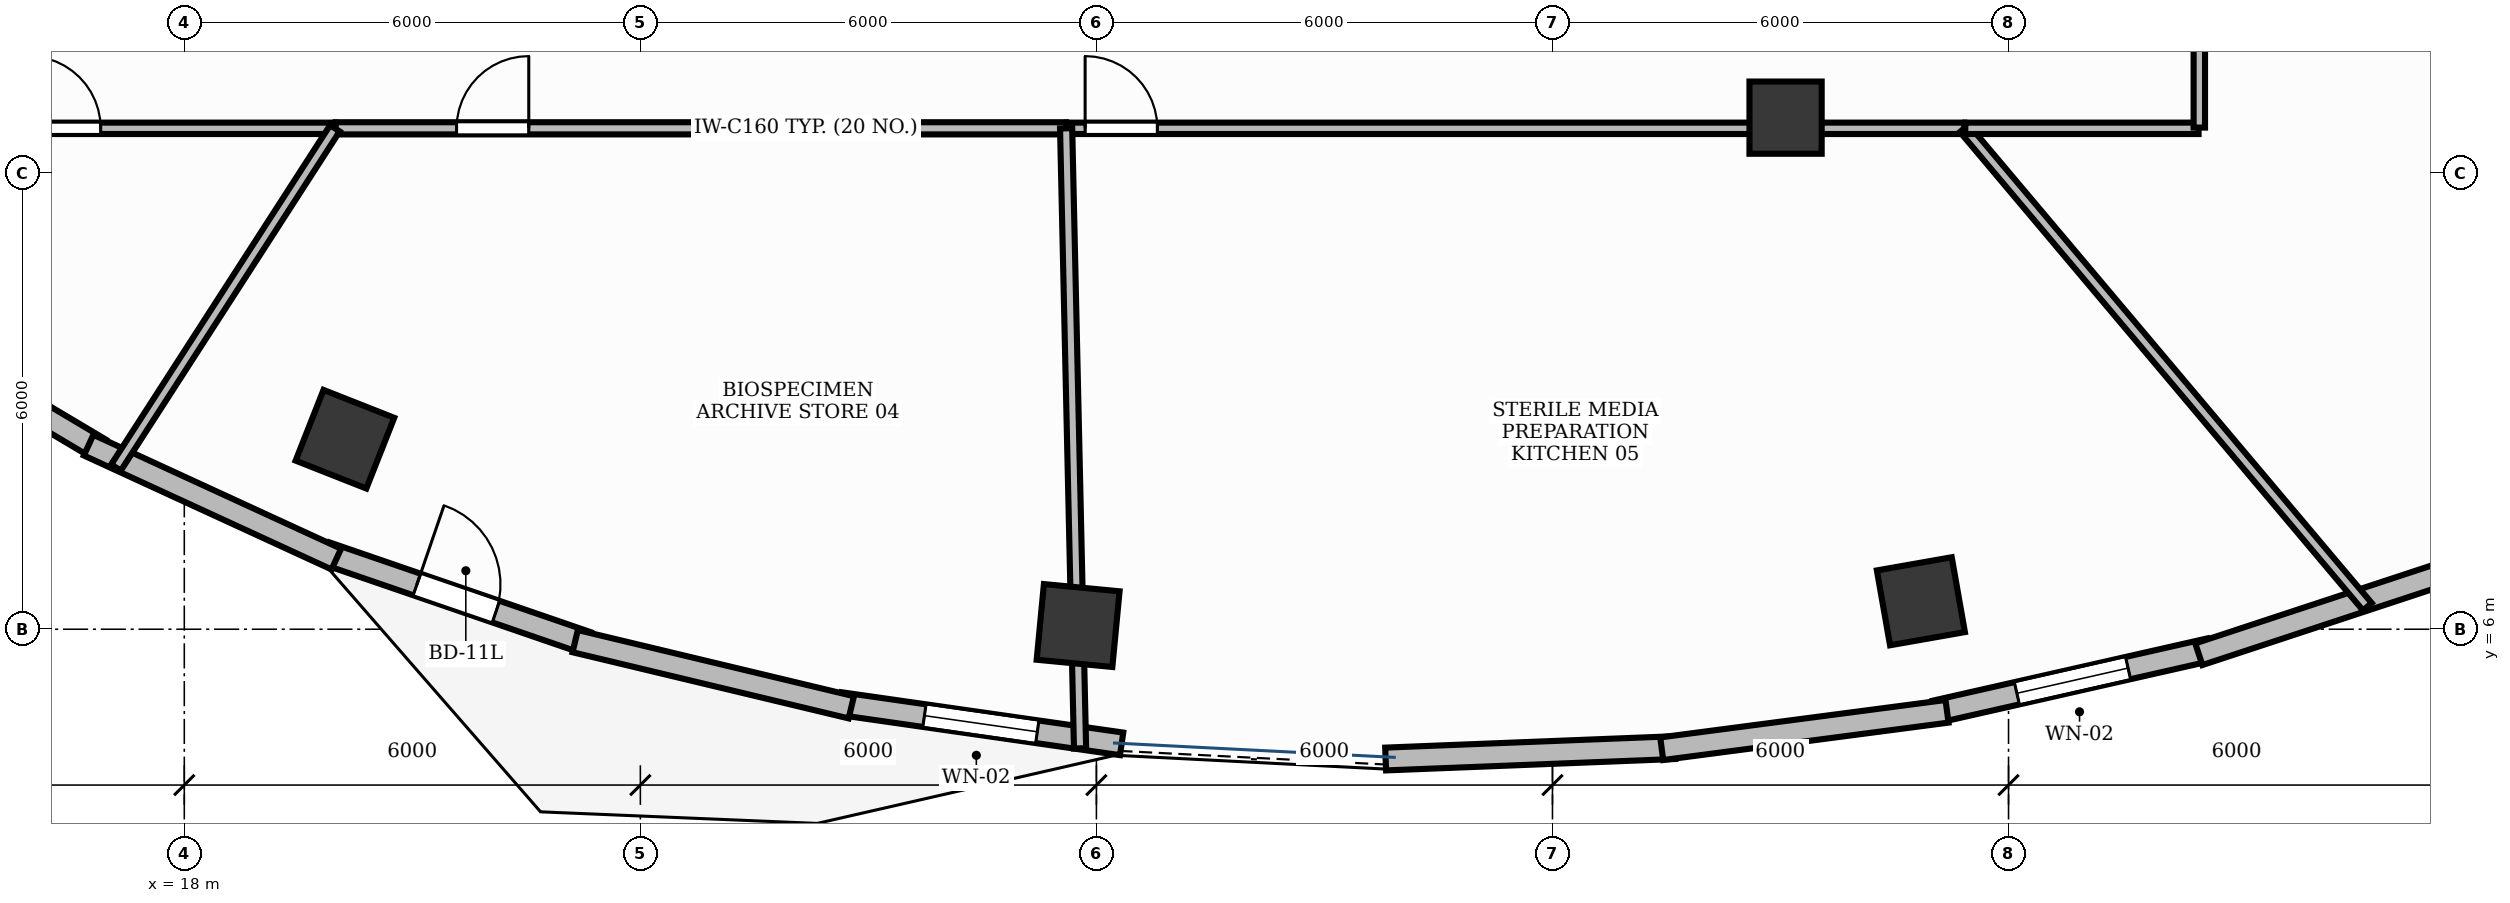
"""IFC4 building model, lengths in metres.
Left out: names, types, materials, properties, quantities, classifications, styles, units other than length and angle.
Written with IfcOpenShell. Run it as: python <this file> out.ifc"""

import sys

from ifc_helpers import new_model, si_unit, direction, frame, frame_2d, origin, origin_2d, place, context, subcontext, project, spatial, rectangle, extrude, element, fill, save


model = new_model("IFC4")
c1 = context("Model", 3, precision=1e-05, world=origin(), true_north=direction((0.0, 1.0)))
c2 = subcontext(c1, "Body", "Model", "MODEL_VIEW")
j1 = project(units=[si_unit("LENGTHUNIT", "METRE"), si_unit("PLANEANGLEUNIT", "RADIAN")], contexts=[c1])
p1 = place(None, origin())
s1 = spatial("IfcSite", under=j1, at=p1, CompositionType="ELEMENT")
p2 = place(p1, origin())
s2 = spatial("IfcBuilding", under=s1, at=p2, CompositionType="ELEMENT")
p3 = place(p2, frame((0.0, 0.0, 226.8)))
s3 = spatial("IfcBuildingStorey", under=s2, at=p3, CompositionType="ELEMENT", Elevation=226.8)
for number, where, z_axis, x_axis in (
    (1, (20.113, 8.5, -0.0), (0.0, 0.0, 1.0), (-0.93, 0.367, 0.0)),
    (2, (29.759, 6.049, -0.0), (0.0, 0.0, 1.0), (-0.995, 0.095, 0.0)),
    (3, (40.847, 6.368, -0.0), (0.0, 0.0, 1.0), (0.985, 0.173, 0.0)),
):
    element("IfcColumn", number, at=place(p3, frame(where, z_axis=z_axis, x_axis=x_axis)), inside=s3, PredefinedType="COLUMN", context=c2, shape_type="SweptSolid", body=[
        extrude(rectangle(XDim=1.0, YDim=1.0, at=origin_2d()), origin(), (0.0, 0.0, 1.0), 3.901),
    ])
p4 = place(p3, frame((39.067, 12.73, -0.0), z_axis=(0.0, 0.0, 1.0), x_axis=(1.0, 0.0, 0.0)))
e4 = element("IfcColumn", 4, at=p4, inside=s3, PredefinedType="COLUMN", context=c2, shape_type="SweptSolid", body=[
    extrude(rectangle(XDim=0.95, YDim=0.95, at=origin_2d()), origin(), (0.0, 0.0, 1.0), 3.901),
])
p5 = place(p3, frame((13.923, 10.132, 0.0), z_axis=(0.0, 0.0, 1.0), x_axis=(0.859459434124, -0.511203952543, 0.0)))
e5 = element("IfcWall", 5, at=p5, inside=s3, PredefinedType="STANDARD", context=c2, shape_type="SweptSolid", body=[
    extrude(rectangle(XDim=3.45, YDim=0.3, at=frame_2d((1.725, 0.0))), origin(), (0.0, 0.0, 1.0), 3.9),
])
p6 = place(p5, frame((0.975, 0.0, 0.95)))
e6 = element("IfcOpeningElement", 6, at=p6, cuts=e5, PredefinedType="OPENING", context=c2, shape_type="SweptSolid", body=[
    extrude(rectangle(XDim=1.5, YDim=1.8, at=frame_2d((0.75, 0.9))), frame((0.0, 0.165, 0.0), z_axis=(0.0, -1.0, 0.0), x_axis=(1.0, 0.0, 0.0)), (0.0, 0.0, 1.0), 0.33),
])
p7 = place(p3, frame((19.864, 7.0, 0.0), z_axis=(0.0, 0.0, 1.0), x_axis=(0.945702753898, -0.325032769531, 0.0)))
e7 = element("IfcWall", 7, at=p7, inside=s3, PredefinedType="STANDARD", context=c2, shape_type="SweptSolid", body=[
    extrude(rectangle(XDim=3.629, YDim=0.3, at=frame_2d((1.815, 0.0))), origin(), (0.0, 0.0, 1.0), 3.47),
])
p8 = place(p7, frame((1.265, 0.0, 0.0)))
e8 = element("IfcOpeningElement", 8, at=p8, cuts=e7, PredefinedType="OPENING", context=c2, shape_type="SweptSolid", body=[
    extrude(rectangle(XDim=1.1, YDim=2.15, at=frame_2d((0.55, 1.075))), frame((0.0, 0.165, 0.0), z_axis=(0.0, -1.0, 0.0), x_axis=(1.0, 0.0, 0.0)), (0.0, 0.0, 1.0), 0.33),
])
p9 = place(p3, frame((26.628, 5.022, 0.0), z_axis=(0.0, 0.0, 1.0), x_axis=(0.989905072127, -0.14173195891, 0.0)))
e9 = element("IfcWall", 9, at=p9, inside=s3, PredefinedType="STANDARD", context=c2, shape_type="SweptSolid", body=[
    extrude(rectangle(XDim=3.741, YDim=0.3, at=frame_2d((1.871, 0.0))), origin(), (0.0, 0.0, 1.0), 3.47),
])
p10 = place(p9, frame((1.121, 0.0, 0.95)))
e10 = element("IfcOpeningElement", 10, at=p10, cuts=e9, PredefinedType="OPENING", context=c2, shape_type="SweptSolid", body=[
    extrude(rectangle(XDim=1.5, YDim=1.8, at=frame_2d((0.75, 0.9))), frame((0.0, 0.165, 0.0), z_axis=(0.0, -1.0, 0.0), x_axis=(1.0, 0.0, 0.0)), (0.0, 0.0, 1.0), 0.33),
])
p11 = place(p3, frame((41.036, 4.914, 0.0), z_axis=(0.0, 0.0, 1.0), x_axis=(0.975237678872, 0.221159376263, 0.0)))
e11 = element("IfcWall", 11, at=p11, inside=s3, PredefinedType="STANDARD", context=c2, shape_type="SweptSolid", body=[
    extrude(rectangle(XDim=3.703, YDim=0.3, at=frame_2d((1.851, 0.0))), origin(), (0.0, 0.0, 1.0), 3.9),
])
p12 = place(p11, frame((1.101, 0.0, 0.95)))
e12 = element("IfcOpeningElement", 12, at=p12, cuts=e11, PredefinedType="OPENING", context=c2, shape_type="SweptSolid", body=[
    extrude(rectangle(XDim=1.5, YDim=1.8, at=frame_2d((0.75, 0.9))), frame((0.0, 0.165, 0.0), z_axis=(0.0, -1.0, 0.0), x_axis=(1.0, 0.0, 0.0)), (0.0, 0.0, 1.0), 0.33),
])
p13 = place(p3, frame((16.741, 8.422, 0.0), z_axis=(0.0, 0.0, 1.0), x_axis=(0.908506474671, -0.417870776055, 0.0)))
e13 = element("IfcWall", 13, at=p13, inside=s3, PredefinedType="STANDARD", context=c2, shape_type="SweptSolid", body=[
    extrude(rectangle(XDim=3.587, YDim=0.3, at=frame_2d((1.793, 0.0))), origin(), (0.0, 0.0, 1.0), 3.9),
])
p14 = place(p3, frame((23.143, 5.843, 0.0), z_axis=(0.0, 0.0, 1.0), x_axis=(0.972475629939, -0.233004611918, 0.0)))
e14 = element("IfcWall", 14, at=p14, inside=s3, PredefinedType="STANDARD", context=c2, shape_type="SweptSolid", body=[
    extrude(rectangle(XDim=3.735, YDim=0.3, at=frame_2d((1.868, 0.0))), origin(), (0.0, 0.0, 1.0), 3.9),
])
p15 = place(p3, frame((33.805, 4.292, 0.0), z_axis=(0.0, 0.0, 1.0), x_axis=(0.999221923177, 0.039440439173, 0.0)))
e15 = element("IfcWall", 15, at=p15, inside=s3, PredefinedType="STANDARD", context=c2, shape_type="SweptSolid", body=[
    extrude(rectangle(XDim=3.807, YDim=0.3, at=frame_2d((1.903, 0.0))), origin(), (0.0, 0.0, 1.0), 3.9),
])
p16 = place(p3, frame((37.437, 4.428, 0.0), z_axis=(0.0, 0.0, 1.0), x_axis=(0.991512801574, 0.130009093201, 0.0)))
e16 = element("IfcWall", 16, at=p16, inside=s3, PredefinedType="STANDARD", context=c2, shape_type="SweptSolid", body=[
    extrude(rectangle(XDim=3.786, YDim=0.3, at=frame_2d((1.893, 0.0))), origin(), (0.0, 0.0, 1.0), 3.9),
])
p17 = place(p3, frame((44.504, 5.671, 0.0), z_axis=(0.0, 0.0, 1.0), x_axis=(0.94972655205, 0.313080622734, 0.0)))
e17 = element("IfcWall", 17, at=p17, inside=s3, PredefinedType="STANDARD", context=c2, shape_type="SweptSolid", body=[
    extrude(rectangle(XDim=3.679, YDim=0.3, at=frame_2d((1.84, 0.0))), origin(), (0.0, 0.0, 1.0), 3.9),
])
p18 = place(p3, frame((14.454, 12.59, 0.0), z_axis=(0.0, 0.0, 1.0), x_axis=(1.0, 0.0, 0.0)))
e18 = element("IfcWall", 18, at=p18, inside=s3, PredefinedType="PARTITIONING", context=c2, shape_type="SweptSolid", body=[
    extrude(rectangle(XDim=5.527, YDim=0.15, at=frame_2d((2.763, 0.0))), origin(), (0.0, 0.0, 1.0), 2.91),
])
p19 = place(p18, frame((1.496, 0.0, 0.0)))
e19 = element("IfcOpeningElement", 19, at=p19, cuts=e18, PredefinedType="OPENING", context=c2, shape_type="SweptSolid", body=[
    extrude(rectangle(XDim=0.95, YDim=2.15, at=frame_2d((0.475, 1.075))), frame((0.0, 0.09, 0.0), z_axis=(0.0, -1.0, 0.0), x_axis=(1.0, 0.0, 0.0)), (0.0, 0.0, 1.0), 0.18),
])
p20 = place(p3, frame((19.991, 12.59, 0.0), z_axis=(0.0, 0.0, 1.0), x_axis=(1.0, 0.0, 0.0)))
e20 = element("IfcWall", 20, at=p20, inside=s3, PredefinedType="PARTITIONING", context=c2, shape_type="SweptSolid", body=[
    extrude(rectangle(XDim=9.611, YDim=0.16, at=frame_2d((4.805, 0.0))), origin(), (0.0, 0.0, 1.0), 2.91),
])
p21 = place(p20, frame((1.591, 0.0, 0.0)))
e21 = element("IfcOpeningElement", 21, at=p21, cuts=e20, PredefinedType="OPENING", context=c2, shape_type="SweptSolid", body=[
    extrude(rectangle(XDim=0.95, YDim=2.15, at=frame_2d((0.475, 1.075))), frame((0.0, 0.095, 0.0), z_axis=(0.0, -1.0, 0.0), x_axis=(1.0, 0.0, 0.0)), (0.0, 0.0, 1.0), 0.19),
])
p22 = place(p3, frame((29.612, 12.59, 0.0), z_axis=(0.0, 0.0, 1.0), x_axis=(1.0, 0.0, 0.0)))
e22 = element("IfcWall", 22, at=p22, inside=s3, PredefinedType="PARTITIONING", context=c2, shape_type="SweptSolid", body=[
    extrude(rectangle(XDim=11.806, YDim=0.15, at=frame_2d((5.903, 0.0))), origin(), (0.0, 0.0, 1.0), 2.91),
])
p23 = place(p22, frame((0.24, 0.0, 0.0)))
e23 = element("IfcOpeningElement", 23, at=p23, cuts=e22, PredefinedType="OPENING", context=c2, shape_type="SweptSolid", body=[
    extrude(rectangle(XDim=0.95, YDim=2.15, at=frame_2d((0.475, 1.075))), frame((0.0, 0.09, 0.0), z_axis=(0.0, -1.0, 0.0), x_axis=(1.0, 0.0, 0.0)), (0.0, 0.0, 1.0), 0.18),
])
p24 = place(p3, frame((19.981, 12.59, 0.0), z_axis=(0.0, 0.0, 1.0), x_axis=(-0.542120587928, -0.840300701026, 0.0)))
e24 = element("IfcWall", 24, at=p24, inside=s3, PredefinedType="PARTITIONING", context=c2, shape_type="SweptSolid", body=[
    extrude(rectangle(XDim=5.311, YDim=0.15, at=frame_2d((2.656, 0.0))), origin(), (0.0, 0.0, 1.0), 2.91),
])
p25 = place(p3, frame((29.602, 12.59, 0.0), z_axis=(0.0, 0.0, 1.0), x_axis=(0.02244070068, -0.999748175769, 0.0)))
e25 = element("IfcWall", 25, at=p25, inside=s3, PredefinedType="PARTITIONING", context=c2, shape_type="SweptSolid", body=[
    extrude(rectangle(XDim=8.159, YDim=0.16, at=frame_2d((4.08, 0.0))), origin(), (0.0, 0.0, 1.0), 2.91),
])
p26 = place(p3, frame((41.418, 12.59, 0.0), z_axis=(0.0, 0.0, 1.0), x_axis=(0.644315695233, -0.764759625554, 0.0)))
e26 = element("IfcWall", 26, at=p26, inside=s3, PredefinedType="PARTITIONING", context=c2, shape_type="SweptSolid", body=[
    extrude(rectangle(XDim=8.23, YDim=0.15, at=frame_2d((4.115, 0.0))), origin(), (0.0, 0.0, 1.0), 2.91),
])
p27 = place(p3, frame((41.431, 12.59, 0.0), z_axis=(0.0, 0.0, 1.0), x_axis=(1.0, 0.0, 0.0)))
e27 = element("IfcWall", 27, at=p27, inside=s3, PredefinedType="PARTITIONING", context=c2, shape_type="SweptSolid", body=[
    extrude(rectangle(XDim=3.069, YDim=0.15, at=frame_2d((1.535, 0.0))), origin(), (0.0, 0.0, 1.0), 2.91),
])
p28 = place(p3, frame((44.51, 12.6, 0.0), z_axis=(0.0, 0.0, 1.0), x_axis=(0.0, 1.0, 0.0)))
e28 = element("IfcWall", 28, at=p28, inside=s3, PredefinedType="PARTITIONING", context=c2, shape_type="SweptSolid", body=[
    extrude(rectangle(XDim=3.8, YDim=0.15, at=frame_2d((1.9, 0.0))), origin(), (0.0, 0.0, 1.0), 2.91),
])
p29 = place(p8, origin())
e29 = element("IfcDoor", 29, at=p29, inside=s3, OperationType="SINGLE_SWING_LEFT", PredefinedType="DOOR", context=c2, shape_type="SweptSolid", body=[
    extrude(rectangle(XDim=1.1, YDim=2.15, at=frame_2d((0.55, 1.075))), frame((0.0, 0.025, 0.0), z_axis=(0.0, -1.0, 0.0), x_axis=(1.0, 0.0, 0.0)), (0.0, 0.0, 1.0), 0.05),
])
fill(e8, e29)
p30 = place(p10, origin())
e30 = element("IfcWindow", 30, at=p30, inside=s3, PartitioningType="DOUBLE_PANEL_VERTICAL", PredefinedType="WINDOW", context=c2, shape_type="SweptSolid", body=[
    extrude(rectangle(XDim=1.5, YDim=1.8, at=frame_2d((0.75, 0.9))), frame((0.0, 0.03, 0.0), z_axis=(0.0, -1.0, 0.0), x_axis=(1.0, 0.0, 0.0)), (0.0, 0.0, 1.0), 0.06),
])
fill(e10, e30)
p31 = place(p12, origin())
e31 = element("IfcWindow", 31, at=p31, inside=s3, PartitioningType="DOUBLE_PANEL_VERTICAL", PredefinedType="WINDOW", context=c2, shape_type="SweptSolid", body=[
    extrude(rectangle(XDim=1.5, YDim=1.8, at=frame_2d((0.75, 0.9))), frame((0.0, 0.03, 0.0), z_axis=(0.0, -1.0, 0.0), x_axis=(1.0, 0.0, 0.0)), (0.0, 0.0, 1.0), 0.06),
])
fill(e12, e31)
p32 = place(p19, origin())
e32 = element("IfcDoor", 32, at=p32, inside=s3, OperationType="SINGLE_SWING_LEFT", PredefinedType="DOOR", context=c2, shape_type="SweptSolid", body=[
    extrude(rectangle(XDim=0.95, YDim=2.15, at=frame_2d((0.475, 1.075))), frame((0.0, 0.025, 0.0), z_axis=(0.0, -1.0, 0.0), x_axis=(1.0, 0.0, 0.0)), (0.0, 0.0, 1.0), 0.05),
])
fill(e19, e32)
p33 = place(p21, origin())
e33 = element("IfcDoor", 33, at=p33, inside=s3, OperationType="SINGLE_SWING_RIGHT", PredefinedType="DOOR", context=c2, shape_type="SweptSolid", body=[
    extrude(rectangle(XDim=0.95, YDim=2.15, at=frame_2d((0.475, 1.075))), frame((0.0, 0.025, 0.0), z_axis=(0.0, -1.0, 0.0), x_axis=(1.0, 0.0, 0.0)), (0.0, 0.0, 1.0), 0.05),
])
fill(e21, e33)
p34 = place(p23, origin())
e34 = element("IfcDoor", 34, at=p34, inside=s3, OperationType="SINGLE_SWING_LEFT", PredefinedType="DOOR", context=c2, shape_type="SweptSolid", body=[
    extrude(rectangle(XDim=0.95, YDim=2.15, at=frame_2d((0.475, 1.075))), frame((0.0, 0.025, 0.0), z_axis=(0.0, -1.0, 0.0), x_axis=(1.0, 0.0, 0.0)), (0.0, 0.0, 1.0), 0.05),
])
fill(e23, e34)
save(model, sys.argv[1])
